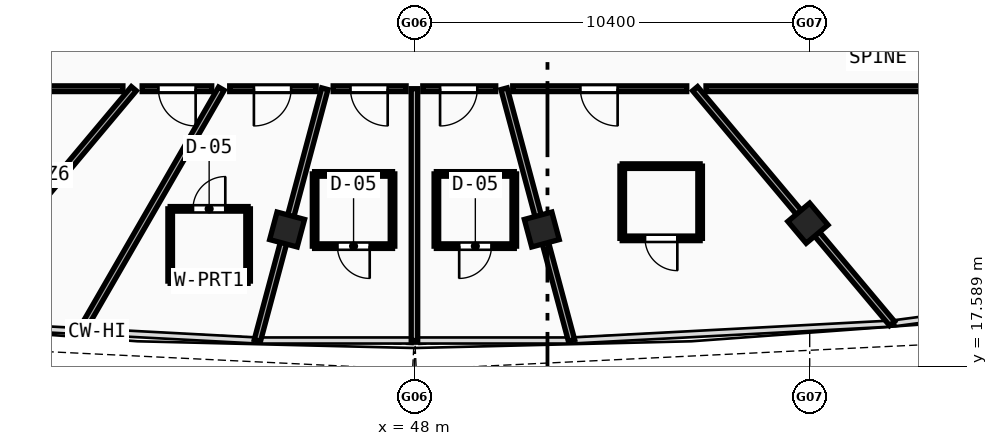
"""IFC4 building model, lengths in metres.
Left out: names, types, materials, properties, quantities, classifications, styles, units other than length and angle.
Written with IfcOpenShell. Run it as: python <this file> out.ifc"""

import sys

from ifc_helpers import new_model, si_unit, direction, frame, frame_2d, origin, origin_with_axes, origin_2d, place, context, subcontext, project, spatial, rectangle, hollow_rectangle, extrude, source, transform, mapped, element, fill, save


model = new_model("IFC4")
c1 = context("Model", 3, precision=1e-05, world=origin(), true_north=direction((0.0, 1.0)))
c2 = subcontext(c1, "Body", "Model", "MODEL_VIEW")
j1 = project(units=[si_unit("LENGTHUNIT", "METRE"), si_unit("PLANEANGLEUNIT", "RADIAN")], contexts=[c1])
p1 = place(None, origin())
s1 = spatial("IfcSite", under=j1, at=p1, CompositionType="ELEMENT")
p2 = place(p1, origin())
s2 = spatial("IfcBuilding", under=s1, at=p2, CompositionType="ELEMENT")
p3 = place(p2, frame((0.0, 0.0, 277.56)))
s3 = spatial("IfcBuildingStorey", under=s2, at=p3, CompositionType="ELEMENT", Elevation=277.56)
m1 = source(origin(), c2, "Body", "SweptSolid", [
    extrude(hollow_rectangle(XDim=0.75, YDim=0.75, WallThickness=0.028, at=origin_2d()), origin(), (0.0, 0.0, 1.0), 3.73),
])
for number, where, z_axis, x_axis in (
    (1, (44.649, 21.196, -0.26), (0.0, 0.0, 1.0), (0.966, -0.259, 0.0)),
    (2, (51.351, 21.196, -0.26), (0.0, 0.0, 1.0), (0.966, 0.259, 0.0)),
    (3, (58.354, 21.362, -0.26), (0.0, 0.0, 1.0), (0.766, 0.643, 0.0)),
):
    element("IfcColumn", number, at=place(p3, frame(where, z_axis=z_axis, x_axis=x_axis)), inside=s3, PredefinedType="COLUMN", context=c2, shape_type="MappedRepresentation", body=[
        mapped(m1, transform((0.0, 0.0, 0.0), scale=1.0)),
    ])
p4 = place(p3, frame((40.616, 24.9, 0.0), z_axis=(0.0, 0.0, 1.0), x_axis=(-0.642788791497, -0.76604345146, 0.0)))
e4 = element("IfcWall", 4, at=p4, inside=s3, PredefinedType="PARTITIONING", context=c2, shape_type="SweptSolid", body=[
    extrude(rectangle(XDim=8.066, YDim=0.17, at=frame_2d((4.033, 0.0))), origin(), (0.0, 0.0, 1.0), 2.87),
])
p5 = place(p3, frame((42.919, 24.9, 0.0), z_axis=(0.0, 0.0, 1.0), x_axis=(-0.499992114976, -0.866029956157, 0.0)))
e5 = element("IfcWall", 5, at=p5, inside=s3, PredefinedType="PARTITIONING", context=c2, shape_type="SweptSolid", body=[
    extrude(rectangle(XDim=7.367, YDim=0.17, at=frame_2d((3.683, 0.0))), origin(), (0.0, 0.0, 1.0), 2.87),
])
p6 = place(p3, frame((45.642, 24.9, 0.0), z_axis=(0.0, 0.0, 1.0), x_axis=(-0.258825643191, -0.965924058312, 0.0)))
e6 = element("IfcWall", 6, at=p6, inside=s3, PredefinedType="PARTITIONING", context=c2, shape_type="SweptSolid", body=[
    extrude(rectangle(XDim=6.858, YDim=0.17, at=frame_2d((3.429, 0.0))), origin(), (0.0, 0.0, 1.0), 2.87),
])
p7 = place(p3, frame((48.0, 24.9, 0.0), z_axis=(0.0, 0.0, 1.0), x_axis=(0.0, -1.0, 0.0)))
e7 = element("IfcWall", 7, at=p7, inside=s3, PredefinedType="PARTITIONING", context=c2, shape_type="SweptSolid", body=[
    extrude(rectangle(XDim=6.625, YDim=0.17, at=frame_2d((3.312, 0.0))), origin(), (0.0, 0.0, 1.0), 2.87),
])
p8 = place(p3, frame((50.358, 24.9, 0.0), z_axis=(0.0, 0.0, 1.0), x_axis=(0.258825643191, -0.965924058312, 0.0)))
e8 = element("IfcWall", 8, at=p8, inside=s3, PredefinedType="PARTITIONING", context=c2, shape_type="SweptSolid", body=[
    extrude(rectangle(XDim=6.858, YDim=0.17, at=frame_2d((3.429, 0.0))), origin(), (0.0, 0.0, 1.0), 2.87),
])
p9 = place(p3, frame((55.384, 24.9, 0.0), z_axis=(0.0, 0.0, 1.0), x_axis=(0.642788791497, -0.76604345146, 0.0)))
e9 = element("IfcWall", 9, at=p9, inside=s3, PredefinedType="PARTITIONING", context=c2, shape_type="SweptSolid", body=[
    extrude(rectangle(XDim=8.066, YDim=0.17, at=frame_2d((4.033, 0.0))), origin(), (0.0, 0.0, 1.0), 2.87),
])
p10 = place(p3, frame((62.85, 24.9, 0.0), z_axis=(0.0, 0.0, 1.0), x_axis=(-1.0, 0.0, 0.0)))
e10 = element("IfcWall", 10, at=p10, inside=s3, PredefinedType="PARTITIONING", context=c2, shape_type="SweptSolid", body=[
    extrude(rectangle(XDim=7.179, YDim=0.15, at=frame_2d((3.589, 0.0))), origin(), (0.0, 0.0, 1.0), 3.12),
])
p11 = place(p3, frame((55.164, 24.9, 0.0), z_axis=(0.0, 0.0, 1.0), x_axis=(-1.0, 0.0, 0.0)))
e11 = element("IfcWall", 11, at=p11, inside=s3, PredefinedType="PARTITIONING", context=c2, shape_type="SweptSolid", body=[
    extrude(rectangle(XDim=4.579, YDim=0.15, at=frame_2d((2.289, 0.0))), origin(), (0.0, 0.0, 1.0), 3.47),
])
p12 = place(p11, frame((1.818, 0.0, 0.0)))
e12 = element("IfcOpeningElement", 12, at=p12, cuts=e11, PredefinedType="OPENING", context=c2, shape_type="SweptSolid", body=[
    extrude(rectangle(XDim=0.98, YDim=2.12, at=frame_2d((0.49, 1.06))), frame((0.0, 0.085, 0.0), z_axis=(0.0, -1.0, 0.0), x_axis=(1.0, 0.0, 0.0)), (0.0, 0.0, 1.0), 0.17),
])
p13 = place(p3, frame((50.138, 24.9, 0.0), z_axis=(0.0, 0.0, 1.0), x_axis=(-1.0, 0.0, 0.0)))
e13 = element("IfcWall", 13, at=p13, inside=s3, PredefinedType="PARTITIONING", context=c2, shape_type="SweptSolid", body=[
    extrude(rectangle(XDim=1.918, YDim=0.15, at=frame_2d((0.959, 0.0))), origin(), (0.0, 0.0, 1.0), 3.12),
])
p14 = place(p13, frame((0.484, 0.0, 0.0)))
e14 = element("IfcOpeningElement", 14, at=p14, cuts=e13, PredefinedType="OPENING", context=c2, shape_type="SweptSolid", body=[
    extrude(rectangle(XDim=0.98, YDim=2.12, at=frame_2d((0.49, 1.06))), frame((0.0, 0.085, 0.0), z_axis=(0.0, -1.0, 0.0), x_axis=(1.0, 0.0, 0.0)), (0.0, 0.0, 1.0), 0.17),
])
p15 = place(p3, frame((47.78, 24.9, 0.0), z_axis=(0.0, 0.0, 1.0), x_axis=(-1.0, 0.0, 0.0)))
e15 = element("IfcWall", 15, at=p15, inside=s3, PredefinedType="PARTITIONING", context=c2, shape_type="SweptSolid", body=[
    extrude(rectangle(XDim=1.918, YDim=0.15, at=frame_2d((0.959, 0.0))), origin(), (0.0, 0.0, 1.0), 3.12),
])
p16 = place(p15, frame((0.484, 0.0, 0.0)))
e16 = element("IfcOpeningElement", 16, at=p16, cuts=e15, PredefinedType="OPENING", context=c2, shape_type="SweptSolid", body=[
    extrude(rectangle(XDim=0.98, YDim=2.12, at=frame_2d((0.49, 1.06))), frame((0.0, 0.085, 0.0), z_axis=(0.0, -1.0, 0.0), x_axis=(1.0, 0.0, 0.0)), (0.0, 0.0, 1.0), 0.17),
])
p17 = place(p3, frame((45.414, 24.9, 0.0), z_axis=(0.0, 0.0, 1.0), x_axis=(-1.0, 0.0, 0.0)))
e17 = element("IfcWall", 17, at=p17, inside=s3, PredefinedType="PARTITIONING", context=c2, shape_type="SweptSolid", body=[
    extrude(rectangle(XDim=2.275, YDim=0.15, at=frame_2d((1.138, 0.0))), origin(), (0.0, 0.0, 1.0), 3.47),
])
p18 = place(p17, frame((0.658, 0.0, 0.0)))
e18 = element("IfcOpeningElement", 18, at=p18, cuts=e17, PredefinedType="OPENING", context=c2, shape_type="SweptSolid", body=[
    extrude(rectangle(XDim=0.98, YDim=2.12, at=frame_2d((0.49, 1.06))), frame((0.0, 0.085, 0.0), z_axis=(0.0, -1.0, 0.0), x_axis=(1.0, 0.0, 0.0)), (0.0, 0.0, 1.0), 0.17),
])
p19 = place(p3, frame((42.665, 24.9, 0.0), z_axis=(0.0, 0.0, 1.0), x_axis=(-1.0, 0.0, 0.0)))
e19 = element("IfcWall", 19, at=p19, inside=s3, PredefinedType="PARTITIONING", context=c2, shape_type="SweptSolid", body=[
    extrude(rectangle(XDim=1.83, YDim=0.15, at=frame_2d((0.915, 0.0))), origin(), (0.0, 0.0, 1.0), 3.47),
])
p20 = place(p19, frame((0.423, 0.0, 0.0)))
e20 = element("IfcOpeningElement", 20, at=p20, cuts=e19, PredefinedType="OPENING", context=c2, shape_type="SweptSolid", body=[
    extrude(rectangle(XDim=0.98, YDim=2.12, at=frame_2d((0.49, 1.06))), frame((0.0, 0.085, 0.0), z_axis=(0.0, -1.0, 0.0), x_axis=(1.0, 0.0, 0.0)), (0.0, 0.0, 1.0), 0.17),
])
p21 = place(p3, frame((40.329, 24.9, 0.0), z_axis=(0.0, 0.0, 1.0), x_axis=(-1.0, 0.0, 0.0)))
e21 = element("IfcWall", 21, at=p21, inside=s3, PredefinedType="PARTITIONING", context=c2, shape_type="SweptSolid", body=[
    extrude(rectangle(XDim=7.179, YDim=0.15, at=frame_2d((3.589, 0.0))), origin(), (0.0, 0.0, 1.0), 3.12),
])
p22 = place(p21, frame((3.201, 0.0, 0.0)))
e22 = element("IfcOpeningElement", 22, at=p22, cuts=e21, PredefinedType="OPENING", context=c2, shape_type="SweptSolid", body=[
    extrude(rectangle(XDim=0.98, YDim=2.12, at=frame_2d((0.49, 1.06))), frame((0.0, 0.085, 0.0), z_axis=(0.0, -1.0, 0.0), x_axis=(1.0, 0.0, 0.0)), (0.0, 0.0, 1.0), 0.17),
])
p23 = place(p3, frame((41.573, 19.839, 0.0), z_axis=(0.0, 0.0, 1.0), x_axis=(1.0, 0.0, 0.0)))
e23 = element("IfcWall", 23, at=p23, inside=s3, PredefinedType="PARTITIONING", context=c2, shape_type="SweptSolid", body=[
    extrude(rectangle(XDim=2.05, YDim=0.12, at=frame_2d((1.025, 0.0))), origin(), (0.0, 0.0, 1.0), 3.47),
])
p24 = place(p3, frame((43.623, 19.839, 0.0), z_axis=(0.0, 0.0, 1.0), x_axis=(0.0, 1.0, 0.0)))
e24 = element("IfcWall", 24, at=p24, inside=s3, PredefinedType="PARTITIONING", context=c2, shape_type="SweptSolid", body=[
    extrude(rectangle(XDim=1.9, YDim=0.12, at=frame_2d((0.95, 0.0))), origin(), (0.0, 0.0, 1.0), 2.87),
])
p25 = place(p3, frame((43.623, 21.739, 0.0), z_axis=(0.0, 0.0, 1.0), x_axis=(-1.0, 0.0, 0.0)))
e25 = element("IfcWall", 25, at=p25, inside=s3, PredefinedType="PARTITIONING", context=c2, shape_type="SweptSolid", body=[
    extrude(rectangle(XDim=2.05, YDim=0.12, at=frame_2d((1.025, 0.0))), origin(), (0.0, 0.0, 1.0), 3.47),
])
p26 = place(p25, frame((0.6, 0.0, 0.0)))
e26 = element("IfcOpeningElement", 26, at=p26, cuts=e25, PredefinedType="OPENING", context=c2, shape_type="SweptSolid", body=[
    extrude(rectangle(XDim=0.85, YDim=2.1, at=frame_2d((0.425, 1.05))), frame((0.0, 0.07, 0.0), z_axis=(0.0, -1.0, 0.0), x_axis=(1.0, 0.0, 0.0)), (0.0, 0.0, 1.0), 0.14),
])
p27 = place(p3, frame((41.573, 21.739, 0.0), z_axis=(0.0, 0.0, 1.0), x_axis=(0.0, -1.0, 0.0)))
e27 = element("IfcWall", 27, at=p27, inside=s3, PredefinedType="PARTITIONING", context=c2, shape_type="SweptSolid", body=[
    extrude(rectangle(XDim=1.9, YDim=0.12, at=frame_2d((0.95, 0.0))), origin(), (0.0, 0.0, 1.0), 2.87),
])
p28 = place(p3, frame((45.373, 20.758, 0.0), z_axis=(0.0, 0.0, 1.0), x_axis=(1.0, 0.0, 0.0)))
e28 = element("IfcWall", 28, at=p28, inside=s3, PredefinedType="PARTITIONING", context=c2, shape_type="SweptSolid", body=[
    extrude(rectangle(XDim=2.05, YDim=0.12, at=frame_2d((1.025, 0.0))), origin(), (0.0, 0.0, 1.0), 3.47),
])
p29 = place(p28, frame((0.6, 0.0, 0.0)))
e29 = element("IfcOpeningElement", 29, at=p29, cuts=e28, PredefinedType="OPENING", context=c2, shape_type="SweptSolid", body=[
    extrude(rectangle(XDim=0.85, YDim=2.1, at=frame_2d((0.425, 1.05))), frame((0.0, 0.07, 0.0), z_axis=(0.0, -1.0, 0.0), x_axis=(1.0, 0.0, 0.0)), (0.0, 0.0, 1.0), 0.14),
])
p30 = place(p3, frame((47.423, 20.758, 0.0), z_axis=(0.0, 0.0, 1.0), x_axis=(0.0, 1.0, 0.0)))
e30 = element("IfcWall", 30, at=p30, inside=s3, PredefinedType="PARTITIONING", context=c2, shape_type="SweptSolid", body=[
    extrude(rectangle(XDim=1.9, YDim=0.12, at=frame_2d((0.95, 0.0))), origin(), (0.0, 0.0, 1.0), 2.87),
])
p31 = place(p3, frame((47.423, 22.658, 0.0), z_axis=(0.0, 0.0, 1.0), x_axis=(-1.0, 0.0, 0.0)))
e31 = element("IfcWall", 31, at=p31, inside=s3, PredefinedType="PARTITIONING", context=c2, shape_type="SweptSolid", body=[
    extrude(rectangle(XDim=2.05, YDim=0.12, at=frame_2d((1.025, 0.0))), origin(), (0.0, 0.0, 1.0), 3.47),
])
p32 = place(p3, frame((45.373, 22.658, 0.0), z_axis=(0.0, 0.0, 1.0), x_axis=(0.0, -1.0, 0.0)))
e32 = element("IfcWall", 32, at=p32, inside=s3, PredefinedType="PARTITIONING", context=c2, shape_type="SweptSolid", body=[
    extrude(rectangle(XDim=1.9, YDim=0.12, at=frame_2d((0.95, 0.0))), origin(), (0.0, 0.0, 1.0), 2.87),
])
p33 = place(p3, frame((48.577, 20.758, 0.0), z_axis=(0.0, 0.0, 1.0), x_axis=(1.0, 0.0, 0.0)))
e33 = element("IfcWall", 33, at=p33, inside=s3, PredefinedType="PARTITIONING", context=c2, shape_type="SweptSolid", body=[
    extrude(rectangle(XDim=2.05, YDim=0.12, at=frame_2d((1.025, 0.0))), origin(), (0.0, 0.0, 1.0), 3.47),
])
p34 = place(p33, frame((0.6, 0.0, 0.0)))
e34 = element("IfcOpeningElement", 34, at=p34, cuts=e33, PredefinedType="OPENING", context=c2, shape_type="SweptSolid", body=[
    extrude(rectangle(XDim=0.85, YDim=2.1, at=frame_2d((0.425, 1.05))), frame((0.0, 0.07, 0.0), z_axis=(0.0, -1.0, 0.0), x_axis=(1.0, 0.0, 0.0)), (0.0, 0.0, 1.0), 0.14),
])
p35 = place(p3, frame((50.627, 20.758, 0.0), z_axis=(0.0, 0.0, 1.0), x_axis=(0.0, 1.0, 0.0)))
e35 = element("IfcWall", 35, at=p35, inside=s3, PredefinedType="PARTITIONING", context=c2, shape_type="SweptSolid", body=[
    extrude(rectangle(XDim=1.9, YDim=0.12, at=frame_2d((0.95, 0.0))), origin(), (0.0, 0.0, 1.0), 2.87),
])
p36 = place(p3, frame((50.627, 22.658, 0.0), z_axis=(0.0, 0.0, 1.0), x_axis=(-1.0, 0.0, 0.0)))
e36 = element("IfcWall", 36, at=p36, inside=s3, PredefinedType="PARTITIONING", context=c2, shape_type="SweptSolid", body=[
    extrude(rectangle(XDim=2.05, YDim=0.12, at=frame_2d((1.025, 0.0))), origin(), (0.0, 0.0, 1.0), 3.47),
])
p37 = place(p3, frame((48.577, 22.658, 0.0), z_axis=(0.0, 0.0, 1.0), x_axis=(0.0, -1.0, 0.0)))
e37 = element("IfcWall", 37, at=p37, inside=s3, PredefinedType="PARTITIONING", context=c2, shape_type="SweptSolid", body=[
    extrude(rectangle(XDim=1.9, YDim=0.12, at=frame_2d((0.95, 0.0))), origin(), (0.0, 0.0, 1.0), 2.87),
])
p38 = place(p3, frame((53.467, 20.963, 0.0), z_axis=(0.0, 0.0, 1.0), x_axis=(1.0, 0.0, 0.0)))
e38 = element("IfcWall", 38, at=p38, inside=s3, PredefinedType="PARTITIONING", context=c2, shape_type="SweptSolid", body=[
    extrude(rectangle(XDim=2.05, YDim=0.12, at=frame_2d((1.025, 0.0))), origin(), (0.0, 0.0, 1.0), 3.47),
])
p39 = place(p38, frame((0.6, 0.0, 0.0)))
e39 = element("IfcOpeningElement", 39, at=p39, cuts=e38, PredefinedType="OPENING", context=c2, shape_type="SweptSolid", body=[
    extrude(rectangle(XDim=0.85, YDim=2.1, at=frame_2d((0.425, 1.05))), frame((0.0, 0.07, 0.0), z_axis=(0.0, -1.0, 0.0), x_axis=(1.0, 0.0, 0.0)), (0.0, 0.0, 1.0), 0.14),
])
p40 = place(p3, frame((55.517, 20.963, 0.0), z_axis=(0.0, 0.0, 1.0), x_axis=(0.0, 1.0, 0.0)))
e40 = element("IfcWall", 40, at=p40, inside=s3, PredefinedType="PARTITIONING", context=c2, shape_type="SweptSolid", body=[
    extrude(rectangle(XDim=1.9, YDim=0.12, at=frame_2d((0.95, 0.0))), origin(), (0.0, 0.0, 1.0), 2.87),
])
p41 = place(p3, frame((55.517, 22.863, 0.0), z_axis=(0.0, 0.0, 1.0), x_axis=(-1.0, 0.0, 0.0)))
e41 = element("IfcWall", 41, at=p41, inside=s3, PredefinedType="PARTITIONING", context=c2, shape_type="SweptSolid", body=[
    extrude(rectangle(XDim=2.05, YDim=0.12, at=frame_2d((1.025, 0.0))), origin(), (0.0, 0.0, 1.0), 3.47),
])
p42 = place(p3, frame((53.467, 22.863, 0.0), z_axis=(0.0, 0.0, 1.0), x_axis=(0.0, -1.0, 0.0)))
e42 = element("IfcWall", 42, at=p42, inside=s3, PredefinedType="PARTITIONING", context=c2, shape_type="SweptSolid", body=[
    extrude(rectangle(XDim=1.9, YDim=0.12, at=frame_2d((0.95, 0.0))), origin(), (0.0, 0.0, 1.0), 2.87),
])
m2 = source(origin(), c2, "Body", "SweptSolid", [
    extrude(rectangle(XDim=0.98, YDim=2.12, at=frame_2d((0.49, 1.06))), frame((0.0, 0.025, 0.0), z_axis=(0.0, -1.0, 0.0), x_axis=(1.0, 0.0, 0.0)), (0.0, 0.0, 1.0), 0.05),
])
p43 = place(p20, origin_with_axes())
e43 = element("IfcDoor", 43, at=p43, inside=s3, OperationType="SINGLE_SWING_LEFT", PredefinedType="DOOR", context=c2, shape_type="MappedRepresentation", body=[
    mapped(m2, transform((0.0, 0.0, 0.0), scale=1.0)),
])
fill(e20, e43)
p44 = place(p18, origin_with_axes())
e44 = element("IfcDoor", 44, at=p44, inside=s3, OperationType="SINGLE_SWING_RIGHT", PredefinedType="DOOR", context=c2, shape_type="MappedRepresentation", body=[
    mapped(m2, transform((0.0, 0.0, 0.0), scale=1.0)),
])
fill(e18, e44)
m3 = source(origin(), c2, "Body", "SweptSolid", [
    extrude(rectangle(XDim=0.85, YDim=2.1, at=frame_2d((0.425, 1.05))), frame((0.0, 0.025, 0.0), z_axis=(0.0, -1.0, 0.0), x_axis=(1.0, 0.0, 0.0)), (0.0, 0.0, 1.0), 0.05),
])
p45 = place(p26, frame((0.85, 0.0, 0.0), z_axis=(0.0, 0.0, 1.0), x_axis=(-1.0, 0.0, 0.0)))
e45 = element("IfcDoor", 45, at=p45, inside=s3, OperationType="SINGLE_SWING_RIGHT", PredefinedType="DOOR", context=c2, shape_type="MappedRepresentation", body=[
    mapped(m3, transform((0.0, 0.0, 0.0), scale=1.0)),
])
fill(e26, e45)
p46 = place(p16, origin_with_axes())
e46 = element("IfcDoor", 46, at=p46, inside=s3, OperationType="SINGLE_SWING_LEFT", PredefinedType="DOOR", context=c2, shape_type="MappedRepresentation", body=[
    mapped(m2, transform((0.0, 0.0, 0.0), scale=1.0)),
])
fill(e16, e46)
p47 = place(p29, frame((0.85, 0.0, 0.0), z_axis=(0.0, 0.0, 1.0), x_axis=(-1.0, 0.0, 0.0)))
e47 = element("IfcDoor", 47, at=p47, inside=s3, OperationType="SINGLE_SWING_LEFT", PredefinedType="DOOR", context=c2, shape_type="MappedRepresentation", body=[
    mapped(m3, transform((0.0, 0.0, 0.0), scale=1.0)),
])
fill(e29, e47)
p48 = place(p14, origin_with_axes())
e48 = element("IfcDoor", 48, at=p48, inside=s3, OperationType="SINGLE_SWING_RIGHT", PredefinedType="DOOR", context=c2, shape_type="MappedRepresentation", body=[
    mapped(m2, transform((0.0, 0.0, 0.0), scale=1.0)),
])
fill(e14, e48)
p49 = place(p34, frame((0.85, 0.0, 0.0), z_axis=(0.0, 0.0, 1.0), x_axis=(-1.0, 0.0, 0.0)))
e49 = element("IfcDoor", 49, at=p49, inside=s3, OperationType="SINGLE_SWING_RIGHT", PredefinedType="DOOR", context=c2, shape_type="MappedRepresentation", body=[
    mapped(m3, transform((0.0, 0.0, 0.0), scale=1.0)),
])
fill(e34, e49)
p50 = place(p12, origin_with_axes())
e50 = element("IfcDoor", 50, at=p50, inside=s3, OperationType="SINGLE_SWING_LEFT", PredefinedType="DOOR", context=c2, shape_type="MappedRepresentation", body=[
    mapped(m2, transform((0.0, 0.0, 0.0), scale=1.0)),
])
fill(e12, e50)
p51 = place(p39, frame((0.85, 0.0, 0.0), z_axis=(0.0, 0.0, 1.0), x_axis=(-1.0, 0.0, 0.0)))
e51 = element("IfcDoor", 51, at=p51, inside=s3, OperationType="SINGLE_SWING_LEFT", PredefinedType="DOOR", context=c2, shape_type="MappedRepresentation", body=[
    mapped(m3, transform((0.0, 0.0, 0.0), scale=1.0)),
])
fill(e39, e51)
save(model, sys.argv[1])
